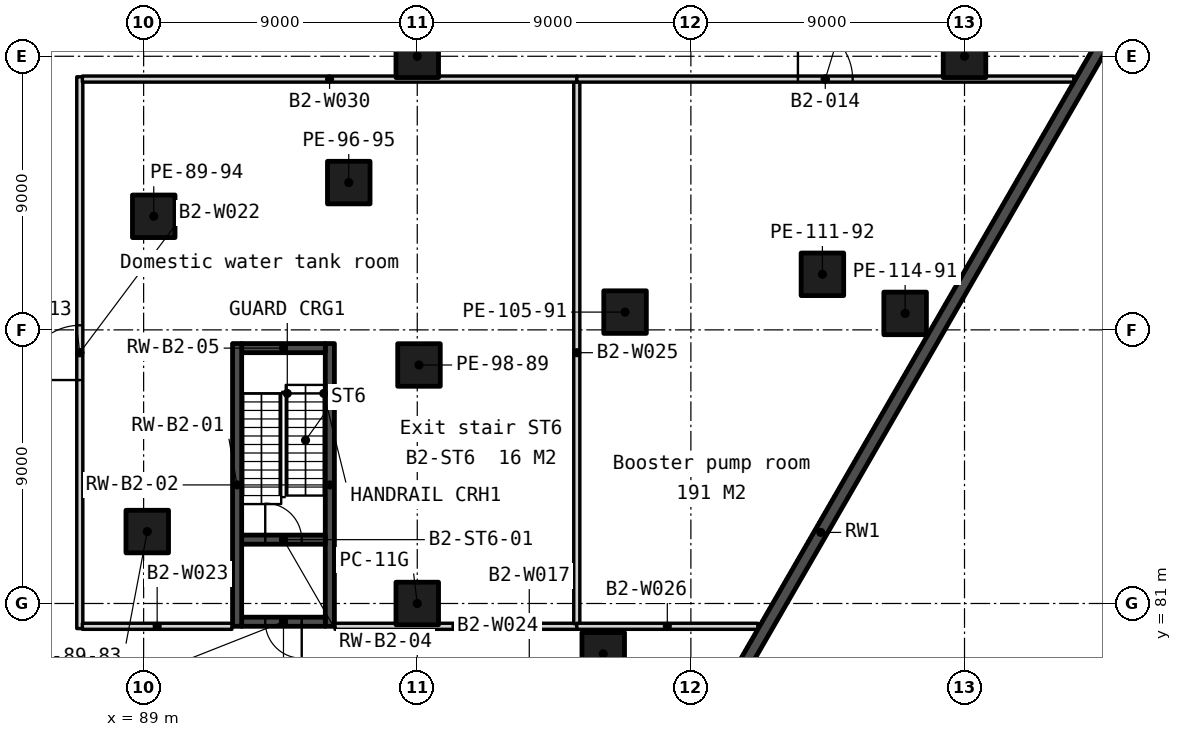
"""IFC4 building model, lengths in metres.
Left out: names, types, materials, properties, quantities, classifications, styles, units other than length and angle.
Written with IfcOpenShell. Run it as: python <this file> out.ifc"""

import sys

from ifc_helpers import new_model, si_unit, direction, frame, frame_2d, origin, origin_2d, place, context, subcontext, project, spatial, rectangle, extrude, element, fill, save


model = new_model("IFC4")
c1 = context("Model", 3, precision=1e-05, world=origin(), true_north=direction((0.0, 1.0)))
c2 = subcontext(c1, "Body", "Model", "MODEL_VIEW")
j1 = project(units=[si_unit("LENGTHUNIT", "METRE"), si_unit("PLANEANGLEUNIT", "RADIAN")], contexts=[c1])
p1 = place(None, origin())
s1 = spatial("IfcSite", under=j1, at=p1, CompositionType="ELEMENT")
p2 = place(p1, origin())
s2 = spatial("IfcBuilding", under=s1, at=p2, CompositionType="ELEMENT")
p3 = place(p2, frame((0.0, 0.0, -9.0)))
s3 = spatial("IfcBuildingStorey", under=s2, at=p3, CompositionType="ELEMENT", Elevation=-9.0)
p4 = place(p3, frame((137.688, 129.089, -0.3), z_axis=(0.0, 0.0, 1.0), x_axis=(-0.499999742059, -0.866025552707, 0.0)))
e1 = element("IfcWall", 1, at=p4, inside=s3, PredefinedType="SOLIDWALL", context=c2, shape_type="SweptSolid", body=[
    extrude(rectangle(XDim=105.659, YDim=0.4, at=frame_2d((52.829, 0.0))), origin(), (0.0, 0.0, 1.0), 4.55),
])
for number, where, z_axis, x_axis in (
    (2, (98.0, 99.0, 0.0), (0.0, 0.0, 1.0), (1.0, 0.0, 0.0)),
    (3, (98.0, 81.0, 0.0), (0.0, 0.0, 1.0), (1.0, 0.0, 0.0)),
    (4, (116.0, 99.0, 0.0), (0.0, 0.0, 1.0), (1.0, 0.0, 0.0)),
    (5, (104.117, 79.343, 0.0), (0.0, 0.0, 1.0), (1.0, 0.0, 0.0)),
    (6, (104.835, 90.585, 0.0), (0.0, 0.0, 1.0), (1.0, 0.0, 0.0)),
    (7, (111.326, 91.828, 0.0), (0.0, 0.0, 1.0), (1.0, 0.0, 0.0)),
    (8, (114.047, 90.542, 0.0), (0.0, 0.0, 1.0), (1.0, 0.0, 0.0)),
    (9, (89.119, 83.366, 0.0), (0.0, 0.0, 1.0), (1.0, 0.0, 0.0)),
    (10, (89.333, 93.736, 0.0), (0.0, 0.0, 1.0), (1.0, 0.0, 0.0)),
    (11, (95.747, 94.845, 0.0), (0.0, 0.0, 1.0), (1.0, 0.0, 0.0)),
    (12, (98.057, 88.845, 0.0), (0.0, 0.0, 1.0), (1.0, 0.0, 0.0)),
):
    element("IfcColumn", number, at=place(p3, frame(where, z_axis=z_axis, x_axis=x_axis)), inside=s3, PredefinedType="COLUMN", context=c2, shape_type="SweptSolid", body=[
        extrude(rectangle(XDim=1.4, YDim=1.4, at=origin_2d()), origin(), (0.0, 0.0, 1.0), 4.5),
    ])
for number, where, z_axis, x_axis in (
    (13, (92.075, 80.25, 0.0), (0.0, 0.0, 1.0), (0.0, 1.0, 0.0)),
    (14, (95.125, 80.25, 0.0), (0.0, 0.0, 1.0), (0.0, 1.0, 0.0)),
):
    element("IfcWall", number, at=place(p3, frame(where, z_axis=z_axis, x_axis=x_axis)), inside=s3, PredefinedType="SOLIDWALL", context=c2, shape_type="SweptSolid", body=[
        extrude(rectangle(XDim=9.3, YDim=0.3, at=frame_2d((4.65, 0.0))), origin(), (0.0, 0.0, 1.0), 4.25),
    ])
p5 = place(p3, frame((92.225, 80.4, 0.0), z_axis=(0.0, 0.0, 1.0), x_axis=(1.0, 0.0, 0.0)))
e15 = element("IfcWall", 15, at=p5, inside=s3, PredefinedType="SOLIDWALL", context=c2, shape_type="SweptSolid", body=[
    extrude(rectangle(XDim=2.75, YDim=0.3, at=frame_2d((1.375, 0.0))), origin(), (0.0, 0.0, 1.0), 4.25),
])
p6 = place(p5, frame((0.775, 0.0, 0.0)))
e16 = element("IfcOpeningElement", 16, at=p6, cuts=e15, PredefinedType="OPENING", context=c2, shape_type="SweptSolid", body=[
    extrude(rectangle(XDim=1.2, YDim=2.1, at=frame_2d((0.6, 1.05))), frame((0.0, 0.16, 0.0), z_axis=(0.0, -1.0, 0.0), x_axis=(1.0, 0.0, 0.0)), (0.0, 0.0, 1.0), 0.32),
])
p7 = place(p3, frame((92.225, 83.1, 0.0), z_axis=(0.0, 0.0, 1.0), x_axis=(1.0, 0.0, 0.0)))
e17 = element("IfcWall", 17, at=p7, inside=s3, PredefinedType="SOLIDWALL", context=c2, shape_type="SweptSolid", body=[
    extrude(rectangle(XDim=2.75, YDim=0.3, at=frame_2d((1.375, 0.0))), origin(), (0.0, 0.0, 1.0), 4.25),
])
p8 = place(p7, frame((0.775, 0.0, 0.0)))
e18 = element("IfcOpeningElement", 18, at=p8, cuts=e17, PredefinedType="OPENING", context=c2, shape_type="SweptSolid", body=[
    extrude(rectangle(XDim=1.2, YDim=2.1, at=frame_2d((0.6, 1.05))), frame((0.0, 0.16, 0.0), z_axis=(0.0, -1.0, 0.0), x_axis=(1.0, 0.0, 0.0)), (0.0, 0.0, 1.0), 0.32),
])
p9 = place(p3, frame((92.225, 89.4, 0.0), z_axis=(0.0, 0.0, 1.0), x_axis=(1.0, 0.0, 0.0)))
e19 = element("IfcWall", 19, at=p9, inside=s3, PredefinedType="SOLIDWALL", context=c2, shape_type="SweptSolid", body=[
    extrude(rectangle(XDim=2.75, YDim=0.3, at=frame_2d((1.375, 0.0))), origin(), (0.0, 0.0, 1.0), 4.25),
])
p10 = place(p3, frame((86.9, 80.175, 0.0), z_axis=(0.0, 0.0, 1.0), x_axis=(0.0, 1.0, 0.0)))
e20 = element("IfcWall", 20, at=p10, inside=s3, PredefinedType="PARTITIONING", context=c2, shape_type="SweptSolid", body=[
    extrude(rectangle(XDim=18.15, YDim=0.2, at=frame_2d((9.075, 0.0))), origin(), (0.0, 0.0, 1.0), 4.25),
])
p11 = place(p10, frame((8.175, 0.0, 0.0)))
e21 = element("IfcOpeningElement", 21, at=p11, cuts=e20, PredefinedType="OPENING", context=c2, shape_type="SweptSolid", body=[
    extrude(rectangle(XDim=1.8, YDim=2.1, at=frame_2d((0.9, 1.05))), frame((0.0, 0.11, 0.0), z_axis=(0.0, -1.0, 0.0), x_axis=(1.0, 0.0, 0.0)), (0.0, 0.0, 1.0), 0.22),
])
p12 = place(p3, frame((86.985, 80.25, 0.0), z_axis=(0.0, 0.0, 1.0), x_axis=(1.0, 0.0, 0.0)))
e22 = element("IfcWall", 22, at=p12, inside=s3, PredefinedType="PARTITIONING", context=c2, shape_type="SweptSolid", body=[
    extrude(rectangle(XDim=4.92, YDim=0.2, at=frame_2d((2.46, 0.0))), origin(), (0.0, 0.0, 1.0), 3.389),
])
p13 = place(p3, frame((95.295, 80.25, 0.0), z_axis=(0.0, 0.0, 1.0), x_axis=(1.0, 0.0, 0.0)))
e23 = element("IfcWall", 23, at=p13, inside=s3, PredefinedType="PARTITIONING", context=c2, shape_type="SweptSolid", body=[
    extrude(rectangle(XDim=7.952, YDim=0.2, at=frame_2d((3.976, 0.0))), origin(), (0.0, 0.0, 1.0), 3.389),
])
p14 = place(p3, frame((103.247, 80.335, 0.0), z_axis=(0.0, 0.0, 1.0), x_axis=(0.0, 1.0, 0.0)))
e24 = element("IfcWall", 24, at=p14, inside=s3, PredefinedType="PARTITIONING", context=c2, shape_type="SweptSolid", body=[
    extrude(rectangle(XDim=17.83, YDim=0.2, at=frame_2d((8.915, 0.0))), origin(), (0.0, 0.0, 1.0), 4.25),
])
p15 = place(p3, frame((103.247, 80.25, 0.0), z_axis=(0.0, 0.0, 1.0), x_axis=(1.0, 0.0, 0.0)))
e25 = element("IfcWall", 25, at=p15, inside=s3, PredefinedType="PARTITIONING", context=c2, shape_type="SweptSolid", body=[
    extrude(rectangle(XDim=5.955, YDim=0.2, at=frame_2d((2.978, 0.0))), origin(), (0.0, 0.0, 1.0), 4.25),
])
p16 = place(p3, frame((86.985, 98.25, 0.0), z_axis=(0.0, 0.0, 1.0), x_axis=(1.0, 0.0, 0.0)))
e26 = element("IfcWall", 26, at=p16, inside=s3, PredefinedType="PARTITIONING", context=c2, shape_type="SweptSolid", body=[
    extrude(rectangle(XDim=16.262, YDim=0.2, at=frame_2d((8.131, 0.0))), origin(), (0.0, 0.0, 1.0), 4.25),
])
p17 = place(p3, frame((103.247, 98.25, 0.0), z_axis=(0.0, 0.0, 1.0), x_axis=(1.0, 0.0, 0.0)))
e27 = element("IfcWall", 27, at=p17, inside=s3, PredefinedType="PARTITIONING", context=c2, shape_type="SweptSolid", body=[
    extrude(rectangle(XDim=16.347, YDim=0.2, at=frame_2d((8.174, 0.0))), origin(), (0.0, 0.0, 1.0), 4.25),
])
p18 = place(p17, frame((7.274, 0.0, 0.0)))
e28 = element("IfcOpeningElement", 28, at=p18, cuts=e27, PredefinedType="OPENING", context=c2, shape_type="SweptSolid", body=[
    extrude(rectangle(XDim=1.8, YDim=2.1, at=frame_2d((0.9, 1.05))), frame((0.0, 0.11, 0.0), z_axis=(0.0, -1.0, 0.0), x_axis=(1.0, 0.0, 0.0)), (0.0, 0.0, 1.0), 0.22),
])
p19 = place(p8, origin())
e29 = element("IfcDoor", 29, at=p19, inside=s3, OperationType="SINGLE_SWING_LEFT", PredefinedType="DOOR", context=c2, shape_type="SweptSolid", body=[
    extrude(rectangle(XDim=1.2, YDim=2.1, at=frame_2d((0.6, 1.05))), frame((0.0, 0.025, 0.0), z_axis=(0.0, -1.0, 0.0), x_axis=(1.0, 0.0, 0.0)), (0.0, 0.0, 1.0), 0.05),
])
fill(e18, e29)
p20 = place(p6, origin())
e30 = element("IfcDoor", 30, at=p20, inside=s3, OperationType="SINGLE_SWING_RIGHT", PredefinedType="DOOR", context=c2, shape_type="SweptSolid", body=[
    extrude(rectangle(XDim=1.2, YDim=2.1, at=frame_2d((0.6, 1.05))), frame((0.0, 0.025, 0.0), z_axis=(0.0, -1.0, 0.0), x_axis=(1.0, 0.0, 0.0)), (0.0, 0.0, 1.0), 0.05),
])
fill(e16, e30)
p21 = place(p11, origin())
e31 = element("IfcDoor", 31, at=p21, inside=s3, OperationType="SINGLE_SWING_LEFT", PredefinedType="DOOR", context=c2, shape_type="SweptSolid", body=[
    extrude(rectangle(XDim=1.8, YDim=2.1, at=frame_2d((0.9, 1.05))), frame((0.0, 0.025, 0.0), z_axis=(0.0, -1.0, 0.0), x_axis=(1.0, 0.0, 0.0)), (0.0, 0.0, 1.0), 0.05),
])
fill(e21, e31)
p22 = place(p18, origin())
e32 = element("IfcDoor", 32, at=p22, inside=s3, OperationType="SINGLE_SWING_LEFT", PredefinedType="DOOR", context=c2, shape_type="SweptSolid", body=[
    extrude(rectangle(XDim=1.8, YDim=2.1, at=frame_2d((0.9, 1.05))), frame((0.0, 0.025, 0.0), z_axis=(0.0, -1.0, 0.0), x_axis=(1.0, 0.0, 0.0)), (0.0, 0.0, 1.0), 0.05),
])
fill(e28, e32)
save(model, sys.argv[1])
